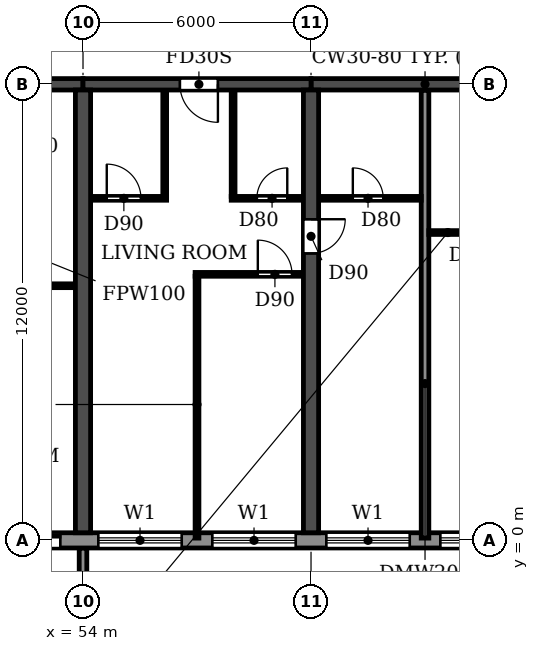
"""IFC4 building model, lengths in metres.
Left out: names, types, materials, properties, quantities, classifications, styles, units other than length and angle.
Written with IfcOpenShell. Run it as: python <this file> out.ifc"""

import sys

from ifc_helpers import new_model, si_unit, direction, frame, frame_2d, origin, place, context, subcontext, project, spatial, polyline, rectangle, outline, extrude, source, transform, mapped, element, fill, save


model = new_model("IFC4")
c1 = context("Model", 3, precision=1e-05, world=origin(), true_north=direction((0.0, 1.0)))
c2 = subcontext(c1, "Body", "Model", "MODEL_VIEW")
j1 = project(units=[si_unit("LENGTHUNIT", "METRE"), si_unit("PLANEANGLEUNIT", "RADIAN")], contexts=[c1])
p1 = place(None, origin())
s1 = spatial("IfcSite", under=j1, at=p1, CompositionType="ELEMENT")
p2 = place(p1, origin())
s2 = spatial("IfcBuilding", under=s1, at=p2, CompositionType="ELEMENT")
p3 = place(p2, frame((0.0, 0.0, 63.0)))
s3 = spatial("IfcBuildingStorey", under=s2, at=p3, CompositionType="ELEMENT", Elevation=63.0)
p4 = place(p3, frame((54.0, 0.2, 0.0), z_axis=(0.0, 0.0, 1.0), x_axis=(0.0, 1.0, 0.0)))
e1 = element("IfcWall", 1, at=p4, inside=s3, PredefinedType="SHEAR", context=c2, shape_type="SweptSolid", body=[
    extrude(rectangle(XDim=11.65, YDim=0.4, at=frame_2d((5.825, 0.0))), origin(), (0.0, 0.0, 1.0), 2.95),
])
p5 = place(p3, frame((60.0, 0.2, 0.0), z_axis=(0.0, 0.0, 1.0), x_axis=(0.0, 1.0, 0.0)))
e2 = element("IfcWall", 2, at=p5, inside=s3, PredefinedType="SHEAR", context=c2, shape_type="SweptSolid", body=[
    extrude(rectangle(XDim=11.65, YDim=0.4, at=frame_2d((5.825, 0.0))), origin(), (0.0, 0.0, 1.0), 2.95),
])
p6 = place(p5, frame((7.35, 0.0, 0.0)))
e3 = element("IfcOpeningElement", 3, at=p6, cuts=e2, PredefinedType="OPENING", context=c2, shape_type="SweptSolid", body=[
    extrude(rectangle(XDim=0.9, YDim=2.1, at=frame_2d((0.45, 1.05))), frame((0.0, 0.21, 0.0), z_axis=(0.0, -1.0, 0.0), x_axis=(1.0, 0.0, 0.0)), (0.0, 0.0, 1.0), 0.42),
])
p7 = place(p3, frame((48.0, 12.0, 0.0), z_axis=(0.0, 0.0, 1.0), x_axis=(1.0, 0.0, 0.0)))
e4 = element("IfcWall", 4, at=p7, inside=s3, PredefinedType="SHEAR", context=c2, shape_type="SweptSolid", body=[
    extrude(rectangle(XDim=6.0, YDim=0.3, at=frame_2d((3.0, 0.0))), origin(), (0.0, 0.0, 1.0), 2.35),
])
p8 = place(p7, frame((2.45, 0.0, 0.0)))
e5 = element("IfcOpeningElement", 5, at=p8, cuts=e4, PredefinedType="OPENING", context=c2, shape_type="SweptSolid", body=[
    extrude(rectangle(XDim=1.0, YDim=2.1, at=frame_2d((0.5, 1.05))), frame((0.0, 0.16, 0.0), z_axis=(0.0, -1.0, 0.0), x_axis=(1.0, 0.0, 0.0)), (0.0, 0.0, 1.0), 0.32),
])
p9 = place(p3, frame((54.0, 12.0, 0.0), z_axis=(0.0, 0.0, 1.0), x_axis=(1.0, 0.0, 0.0)))
e6 = element("IfcWall", 6, at=p9, inside=s3, PredefinedType="SHEAR", context=c2, shape_type="SweptSolid", body=[
    extrude(rectangle(XDim=6.0, YDim=0.3, at=frame_2d((3.0, 0.0))), origin(), (0.0, 0.0, 1.0), 2.35),
])
p10 = place(p9, frame((2.55, 0.0, 0.0)))
e7 = element("IfcOpeningElement", 7, at=p10, cuts=e6, PredefinedType="OPENING", context=c2, shape_type="SweptSolid", body=[
    extrude(rectangle(XDim=1.0, YDim=2.1, at=frame_2d((0.5, 1.05))), frame((0.0, 0.16, 0.0), z_axis=(0.0, -1.0, 0.0), x_axis=(1.0, 0.0, 0.0)), (0.0, 0.0, 1.0), 0.32),
])
p11 = place(p3, frame((60.0, 12.0, 0.0), z_axis=(0.0, 0.0, 1.0), x_axis=(1.0, 0.0, 0.0)))
e8 = element("IfcWall", 8, at=p11, inside=s3, PredefinedType="SHEAR", context=c2, shape_type="SweptSolid", body=[
    extrude(rectangle(XDim=6.0, YDim=0.3, at=frame_2d((3.0, 0.0))), origin(), (0.0, 0.0, 1.0), 2.35),
])
p12 = place(p3, frame((10.683, 0.0, 0.0), z_axis=(0.0, 0.0, 1.0), x_axis=(1.0, 0.0, 0.0)))
e9 = element("IfcWall", 9, at=p12, inside=s3, PredefinedType="STANDARD", context=c2, shape_type="SweptSolid", body=[
    extrude(rectangle(XDim=80.634, YDim=0.4, at=frame_2d((40.317, 0.0))), origin(), (0.0, 0.0, 1.0), 2.95),
])
p13 = place(p12, frame((1.717, 0.0, 0.9)))
e10 = element("IfcOpeningElement", 10, at=p13, cuts=e9, PredefinedType="OPENING", context=c2, shape_type="SweptSolid", body=[
    extrude(rectangle(XDim=2.2, YDim=1.5, at=frame_2d((1.1, 0.75))), frame((0.0, 0.21, 0.0), z_axis=(0.0, -1.0, 0.0), x_axis=(1.0, 0.0, 0.0)), (0.0, 0.0, 1.0), 0.42),
])
p14 = place(p12, frame((4.917, 0.0, 0.0)))
e11 = element("IfcOpeningElement", 11, at=p14, cuts=e9, PredefinedType="OPENING", context=c2, shape_type="SweptSolid", body=[
    extrude(rectangle(XDim=1.8, YDim=2.4, at=frame_2d((0.9, 1.2))), frame((0.0, 0.21, 0.0), z_axis=(0.0, -1.0, 0.0), x_axis=(1.0, 0.0, 0.0)), (0.0, 0.0, 1.0), 0.42),
])
p15 = place(p12, frame((7.717, 0.0, 0.9)))
e12 = element("IfcOpeningElement", 12, at=p15, cuts=e9, PredefinedType="OPENING", context=c2, shape_type="SweptSolid", body=[
    extrude(rectangle(XDim=2.2, YDim=1.5, at=frame_2d((1.1, 0.75))), frame((0.0, 0.21, 0.0), z_axis=(0.0, -1.0, 0.0), x_axis=(1.0, 0.0, 0.0)), (0.0, 0.0, 1.0), 0.42),
])
p16 = place(p12, frame((10.717, 0.0, 0.9)))
e13 = element("IfcOpeningElement", 13, at=p16, cuts=e9, PredefinedType="OPENING", context=c2, shape_type="SweptSolid", body=[
    extrude(rectangle(XDim=2.2, YDim=1.5, at=frame_2d((1.1, 0.75))), frame((0.0, 0.21, 0.0), z_axis=(0.0, -1.0, 0.0), x_axis=(1.0, 0.0, 0.0)), (0.0, 0.0, 1.0), 0.42),
])
p17 = place(p12, frame((13.717, 0.0, 0.9)))
e14 = element("IfcOpeningElement", 14, at=p17, cuts=e9, PredefinedType="OPENING", context=c2, shape_type="SweptSolid", body=[
    extrude(rectangle(XDim=2.2, YDim=1.5, at=frame_2d((1.1, 0.75))), frame((0.0, 0.21, 0.0), z_axis=(0.0, -1.0, 0.0), x_axis=(1.0, 0.0, 0.0)), (0.0, 0.0, 1.0), 0.42),
])
p18 = place(p12, frame((16.917, 0.0, 0.0)))
e15 = element("IfcOpeningElement", 15, at=p18, cuts=e9, PredefinedType="OPENING", context=c2, shape_type="SweptSolid", body=[
    extrude(rectangle(XDim=1.8, YDim=2.4, at=frame_2d((0.9, 1.2))), frame((0.0, 0.21, 0.0), z_axis=(0.0, -1.0, 0.0), x_axis=(1.0, 0.0, 0.0)), (0.0, 0.0, 1.0), 0.42),
])
p19 = place(p12, frame((19.717, 0.0, 0.9)))
e16 = element("IfcOpeningElement", 16, at=p19, cuts=e9, PredefinedType="OPENING", context=c2, shape_type="SweptSolid", body=[
    extrude(rectangle(XDim=2.2, YDim=1.5, at=frame_2d((1.1, 0.75))), frame((0.0, 0.21, 0.0), z_axis=(0.0, -1.0, 0.0), x_axis=(1.0, 0.0, 0.0)), (0.0, 0.0, 1.0), 0.42),
])
p20 = place(p12, frame((22.717, 0.0, 0.9)))
e17 = element("IfcOpeningElement", 17, at=p20, cuts=e9, PredefinedType="OPENING", context=c2, shape_type="SweptSolid", body=[
    extrude(rectangle(XDim=2.2, YDim=1.5, at=frame_2d((1.1, 0.75))), frame((0.0, 0.21, 0.0), z_axis=(0.0, -1.0, 0.0), x_axis=(1.0, 0.0, 0.0)), (0.0, 0.0, 1.0), 0.42),
])
p21 = place(p12, frame((25.917, 0.0, 0.0)))
e18 = element("IfcOpeningElement", 18, at=p21, cuts=e9, PredefinedType="OPENING", context=c2, shape_type="SweptSolid", body=[
    extrude(rectangle(XDim=1.8, YDim=2.4, at=frame_2d((0.9, 1.2))), frame((0.0, 0.21, 0.0), z_axis=(0.0, -1.0, 0.0), x_axis=(1.0, 0.0, 0.0)), (0.0, 0.0, 1.0), 0.42),
])
p22 = place(p12, frame((28.717, 0.0, 0.9)))
e19 = element("IfcOpeningElement", 19, at=p22, cuts=e9, PredefinedType="OPENING", context=c2, shape_type="SweptSolid", body=[
    extrude(rectangle(XDim=2.2, YDim=1.5, at=frame_2d((1.1, 0.75))), frame((0.0, 0.21, 0.0), z_axis=(0.0, -1.0, 0.0), x_axis=(1.0, 0.0, 0.0)), (0.0, 0.0, 1.0), 0.42),
])
p23 = place(p12, frame((31.717, 0.0, 0.9)))
e20 = element("IfcOpeningElement", 20, at=p23, cuts=e9, PredefinedType="OPENING", context=c2, shape_type="SweptSolid", body=[
    extrude(rectangle(XDim=2.2, YDim=1.5, at=frame_2d((1.1, 0.75))), frame((0.0, 0.21, 0.0), z_axis=(0.0, -1.0, 0.0), x_axis=(1.0, 0.0, 0.0)), (0.0, 0.0, 1.0), 0.42),
])
p24 = place(p12, frame((34.717, 0.0, 0.9)))
e21 = element("IfcOpeningElement", 21, at=p24, cuts=e9, PredefinedType="OPENING", context=c2, shape_type="SweptSolid", body=[
    extrude(rectangle(XDim=2.2, YDim=1.5, at=frame_2d((1.1, 0.75))), frame((0.0, 0.21, 0.0), z_axis=(0.0, -1.0, 0.0), x_axis=(1.0, 0.0, 0.0)), (0.0, 0.0, 1.0), 0.42),
])
p25 = place(p12, frame((37.717, 0.0, 0.9)))
e22 = element("IfcOpeningElement", 22, at=p25, cuts=e9, PredefinedType="OPENING", context=c2, shape_type="SweptSolid", body=[
    extrude(rectangle(XDim=2.2, YDim=1.5, at=frame_2d((1.1, 0.75))), frame((0.0, 0.21, 0.0), z_axis=(0.0, -1.0, 0.0), x_axis=(1.0, 0.0, 0.0)), (0.0, 0.0, 1.0), 0.42),
])
p26 = place(p12, frame((40.917, 0.0, 0.0)))
e23 = element("IfcOpeningElement", 23, at=p26, cuts=e9, PredefinedType="OPENING", context=c2, shape_type="SweptSolid", body=[
    extrude(rectangle(XDim=1.8, YDim=2.4, at=frame_2d((0.9, 1.2))), frame((0.0, 0.21, 0.0), z_axis=(0.0, -1.0, 0.0), x_axis=(1.0, 0.0, 0.0)), (0.0, 0.0, 1.0), 0.42),
])
p27 = place(p12, frame((43.717, 0.0, 0.9)))
e24 = element("IfcOpeningElement", 24, at=p27, cuts=e9, PredefinedType="OPENING", context=c2, shape_type="SweptSolid", body=[
    extrude(rectangle(XDim=2.2, YDim=1.5, at=frame_2d((1.1, 0.75))), frame((0.0, 0.21, 0.0), z_axis=(0.0, -1.0, 0.0), x_axis=(1.0, 0.0, 0.0)), (0.0, 0.0, 1.0), 0.42),
])
p28 = place(p12, frame((46.717, 0.0, 0.9)))
e25 = element("IfcOpeningElement", 25, at=p28, cuts=e9, PredefinedType="OPENING", context=c2, shape_type="SweptSolid", body=[
    extrude(rectangle(XDim=2.2, YDim=1.5, at=frame_2d((1.1, 0.75))), frame((0.0, 0.21, 0.0), z_axis=(0.0, -1.0, 0.0), x_axis=(1.0, 0.0, 0.0)), (0.0, 0.0, 1.0), 0.42),
])
p29 = place(p12, frame((49.717, 0.0, 0.9)))
e26 = element("IfcOpeningElement", 26, at=p29, cuts=e9, PredefinedType="OPENING", context=c2, shape_type="SweptSolid", body=[
    extrude(rectangle(XDim=2.2, YDim=1.5, at=frame_2d((1.1, 0.75))), frame((0.0, 0.21, 0.0), z_axis=(0.0, -1.0, 0.0), x_axis=(1.0, 0.0, 0.0)), (0.0, 0.0, 1.0), 0.42),
])
p30 = place(p12, frame((52.717, 0.0, 0.9)))
e27 = element("IfcOpeningElement", 27, at=p30, cuts=e9, PredefinedType="OPENING", context=c2, shape_type="SweptSolid", body=[
    extrude(rectangle(XDim=2.2, YDim=1.5, at=frame_2d((1.1, 0.75))), frame((0.0, 0.21, 0.0), z_axis=(0.0, -1.0, 0.0), x_axis=(1.0, 0.0, 0.0)), (0.0, 0.0, 1.0), 0.42),
])
p31 = place(p12, frame((55.717, 0.0, 0.9)))
e28 = element("IfcOpeningElement", 28, at=p31, cuts=e9, PredefinedType="OPENING", context=c2, shape_type="SweptSolid", body=[
    extrude(rectangle(XDim=2.2, YDim=1.5, at=frame_2d((1.1, 0.75))), frame((0.0, 0.21, 0.0), z_axis=(0.0, -1.0, 0.0), x_axis=(1.0, 0.0, 0.0)), (0.0, 0.0, 1.0), 0.42),
])
p32 = place(p12, frame((58.717, 0.0, 0.9)))
e29 = element("IfcOpeningElement", 29, at=p32, cuts=e9, PredefinedType="OPENING", context=c2, shape_type="SweptSolid", body=[
    extrude(rectangle(XDim=2.2, YDim=1.5, at=frame_2d((1.1, 0.75))), frame((0.0, 0.21, 0.0), z_axis=(0.0, -1.0, 0.0), x_axis=(1.0, 0.0, 0.0)), (0.0, 0.0, 1.0), 0.42),
])
p33 = place(p12, frame((61.717, 0.0, 0.9)))
e30 = element("IfcOpeningElement", 30, at=p33, cuts=e9, PredefinedType="OPENING", context=c2, shape_type="SweptSolid", body=[
    extrude(rectangle(XDim=2.2, YDim=1.5, at=frame_2d((1.1, 0.75))), frame((0.0, 0.21, 0.0), z_axis=(0.0, -1.0, 0.0), x_axis=(1.0, 0.0, 0.0)), (0.0, 0.0, 1.0), 0.42),
])
p34 = place(p12, frame((64.917, 0.0, 0.0)))
e31 = element("IfcOpeningElement", 31, at=p34, cuts=e9, PredefinedType="OPENING", context=c2, shape_type="SweptSolid", body=[
    extrude(rectangle(XDim=1.8, YDim=2.4, at=frame_2d((0.9, 1.2))), frame((0.0, 0.21, 0.0), z_axis=(0.0, -1.0, 0.0), x_axis=(1.0, 0.0, 0.0)), (0.0, 0.0, 1.0), 0.42),
])
p35 = place(p12, frame((67.717, 0.0, 0.9)))
e32 = element("IfcOpeningElement", 32, at=p35, cuts=e9, PredefinedType="OPENING", context=c2, shape_type="SweptSolid", body=[
    extrude(rectangle(XDim=2.2, YDim=1.5, at=frame_2d((1.1, 0.75))), frame((0.0, 0.21, 0.0), z_axis=(0.0, -1.0, 0.0), x_axis=(1.0, 0.0, 0.0)), (0.0, 0.0, 1.0), 0.42),
])
p36 = place(p12, frame((70.717, 0.0, 0.9)))
e33 = element("IfcOpeningElement", 33, at=p36, cuts=e9, PredefinedType="OPENING", context=c2, shape_type="SweptSolid", body=[
    extrude(rectangle(XDim=2.2, YDim=1.5, at=frame_2d((1.1, 0.75))), frame((0.0, 0.21, 0.0), z_axis=(0.0, -1.0, 0.0), x_axis=(1.0, 0.0, 0.0)), (0.0, 0.0, 1.0), 0.42),
])
p37 = place(p12, frame((73.717, 0.0, 0.9)))
e34 = element("IfcOpeningElement", 34, at=p37, cuts=e9, PredefinedType="OPENING", context=c2, shape_type="SweptSolid", body=[
    extrude(rectangle(XDim=2.2, YDim=1.5, at=frame_2d((1.1, 0.75))), frame((0.0, 0.21, 0.0), z_axis=(0.0, -1.0, 0.0), x_axis=(1.0, 0.0, 0.0)), (0.0, 0.0, 1.0), 0.42),
])
p38 = place(p12, frame((76.917, 0.0, 0.0)))
e35 = element("IfcOpeningElement", 35, at=p38, cuts=e9, PredefinedType="OPENING", context=c2, shape_type="SweptSolid", body=[
    extrude(rectangle(XDim=1.8, YDim=2.4, at=frame_2d((0.9, 1.2))), frame((0.0, 0.21, 0.0), z_axis=(0.0, -1.0, 0.0), x_axis=(1.0, 0.0, 0.0)), (0.0, 0.0, 1.0), 0.42),
])
m1 = source(origin(), c2, "Body", "SweptSolid", [
    extrude(outline(polyline([(0.0, 0.0), (0.2, 0.0), (0.2, 1.65), (0.0, 1.65), (0.0, 0.0)])), origin(), (0.0, 0.0, 1.0), 3.1),
])
p39 = place(p3, frame((53.9, -1.85, 0.0)))
e36 = element("IfcWall", 36, at=p39, inside=s3, PredefinedType="STANDARD", context=c2, shape_type="MappedRepresentation", body=[
    mapped(m1, transform((0.0, 0.0, 0.0))),
])
p40 = place(p3, frame((63.0, 0.06, 0.0), z_axis=(0.0, 0.0, 1.0), x_axis=(0.0, 1.0, 0.0)))
e37 = element("IfcWall", 37, at=p40, inside=s3, PredefinedType="PARTITIONING", context=c2, shape_type="SweptSolid", body=[
    extrude(rectangle(XDim=11.78, YDim=0.2, at=frame_2d((5.89, 0.0))), origin(), (0.0, 0.0, 1.0), 2.95),
])
p41 = place(p3, frame((51.8, 6.7, 0.0), z_axis=(0.0, 0.0, 1.0), x_axis=(1.0, 0.0, 0.0)))
e38 = element("IfcWall", 38, at=p41, inside=s3, PredefinedType="PARTITIONING", context=c2, shape_type="SweptSolid", body=[
    extrude(rectangle(XDim=1.99, YDim=0.1, at=frame_2d((0.995, 0.0))), origin(), (0.0, 0.0, 1.0), 2.95),
])
p42 = place(p3, frame((56.95, 7.0, 0.0), z_axis=(0.0, 0.0, 1.0), x_axis=(1.0, 0.0, 0.0)))
e39 = element("IfcWall", 39, at=p42, inside=s3, PredefinedType="PARTITIONING", context=c2, shape_type="SweptSolid", body=[
    extrude(rectangle(XDim=2.84, YDim=0.1, at=frame_2d((1.42, 0.0))), origin(), (0.0, 0.0, 1.0), 2.95),
])
p43 = place(p42, frame((1.65, 0.0, 0.0)))
e40 = element("IfcOpeningElement", 40, at=p43, cuts=e39, PredefinedType="OPENING", context=c2, shape_type="SweptSolid", body=[
    extrude(rectangle(XDim=0.9, YDim=2.1, at=frame_2d((0.45, 1.05))), frame((0.0, 0.06, 0.0), z_axis=(0.0, -1.0, 0.0), x_axis=(1.0, 0.0, 0.0)), (0.0, 0.0, 1.0), 0.12),
])
p44 = place(p3, frame((63.1, 8.1, 0.0), z_axis=(0.0, 0.0, 1.0), x_axis=(1.0, 0.0, 0.0)))
e41 = element("IfcWall", 41, at=p44, inside=s3, PredefinedType="PARTITIONING", context=c2, shape_type="SweptSolid", body=[
    extrude(rectangle(XDim=2.69, YDim=0.1, at=frame_2d((1.345, 0.0))), origin(), (0.0, 0.0, 1.0), 2.95),
])
p45 = place(p44, frame((1.0, 0.0, 0.0)))
e42 = element("IfcOpeningElement", 42, at=p45, cuts=e41, PredefinedType="OPENING", context=c2, shape_type="SweptSolid", body=[
    extrude(rectangle(XDim=0.8, YDim=2.1, at=frame_2d((0.4, 1.05))), frame((0.0, 0.06, 0.0), z_axis=(0.0, -1.0, 0.0), x_axis=(1.0, 0.0, 0.0)), (0.0, 0.0, 1.0), 0.12),
])
p46 = place(p3, frame((54.21, 9.0, 0.0), z_axis=(0.0, 0.0, 1.0), x_axis=(1.0, 0.0, 0.0)))
e43 = element("IfcWall", 43, at=p46, inside=s3, PredefinedType="PARTITIONING", context=c2, shape_type="SweptSolid", body=[
    extrude(rectangle(XDim=1.99, YDim=0.1, at=frame_2d((0.995, 0.0))), origin(), (0.0, 0.0, 1.0), 2.95),
])
p47 = place(p46, frame((0.415, 0.0, 0.0)))
e44 = element("IfcOpeningElement", 44, at=p47, cuts=e43, PredefinedType="OPENING", context=c2, shape_type="SweptSolid", body=[
    extrude(rectangle(XDim=0.9, YDim=2.1, at=frame_2d((0.45, 1.05))), frame((0.0, 0.06, 0.0), z_axis=(0.0, -1.0, 0.0), x_axis=(1.0, 0.0, 0.0)), (0.0, 0.0, 1.0), 0.12),
])
p48 = place(p3, frame((57.9, 9.0, 0.0), z_axis=(0.0, 0.0, 1.0), x_axis=(1.0, 0.0, 0.0)))
e45 = element("IfcWall", 45, at=p48, inside=s3, PredefinedType="PARTITIONING", context=c2, shape_type="SweptSolid", body=[
    extrude(rectangle(XDim=1.89, YDim=0.1, at=frame_2d((0.945, 0.0))), origin(), (0.0, 0.0, 1.0), 2.95),
])
p49 = place(p48, frame((0.675, 0.0, 0.0)))
e46 = element("IfcOpeningElement", 46, at=p49, cuts=e45, PredefinedType="OPENING", context=c2, shape_type="SweptSolid", body=[
    extrude(rectangle(XDim=0.8, YDim=2.1, at=frame_2d((0.4, 1.05))), frame((0.0, 0.06, 0.0), z_axis=(0.0, -1.0, 0.0), x_axis=(1.0, 0.0, 0.0)), (0.0, 0.0, 1.0), 0.12),
])
p50 = place(p3, frame((60.21, 9.0, 0.0), z_axis=(0.0, 0.0, 1.0), x_axis=(1.0, 0.0, 0.0)))
e47 = element("IfcWall", 47, at=p50, inside=s3, PredefinedType="PARTITIONING", context=c2, shape_type="SweptSolid", body=[
    extrude(rectangle(XDim=2.69, YDim=0.1, at=frame_2d((1.345, 0.0))), origin(), (0.0, 0.0, 1.0), 2.95),
])
p51 = place(p50, frame((0.89, 0.0, 0.0)))
e48 = element("IfcOpeningElement", 48, at=p51, cuts=e47, PredefinedType="OPENING", context=c2, shape_type="SweptSolid", body=[
    extrude(rectangle(XDim=0.8, YDim=2.1, at=frame_2d((0.4, 1.05))), frame((0.0, 0.06, 0.0), z_axis=(0.0, -1.0, 0.0), x_axis=(1.0, 0.0, 0.0)), (0.0, 0.0, 1.0), 0.12),
])
p52 = place(p3, frame((56.15, 9.05, 0.0), z_axis=(0.0, 0.0, 1.0), x_axis=(0.0, 1.0, 0.0)))
e49 = element("IfcWall", 49, at=p52, inside=s3, PredefinedType="PARTITIONING", context=c2, shape_type="SweptSolid", body=[
    extrude(rectangle(XDim=2.79, YDim=0.1, at=frame_2d((1.395, 0.0))), origin(), (0.0, 0.0, 1.0), 2.95),
])
p53 = place(p3, frame((57.0, 0.06, 0.0), z_axis=(0.0, 0.0, 1.0), x_axis=(0.0, 1.0, 0.0)))
e50 = element("IfcWall", 50, at=p53, inside=s3, PredefinedType="PARTITIONING", context=c2, shape_type="SweptSolid", body=[
    extrude(rectangle(XDim=6.89, YDim=0.1, at=frame_2d((3.445, 0.0))), origin(), (0.0, 0.0, 1.0), 2.95),
])
p54 = place(p3, frame((57.95, 9.05, 0.0), z_axis=(0.0, 0.0, 1.0), x_axis=(0.0, 1.0, 0.0)))
e51 = element("IfcWall", 51, at=p54, inside=s3, PredefinedType="PARTITIONING", context=c2, shape_type="SweptSolid", body=[
    extrude(rectangle(XDim=2.79, YDim=0.1, at=frame_2d((1.395, 0.0))), origin(), (0.0, 0.0, 1.0), 2.95),
])
p55 = place(p26, origin())
e52 = element("IfcDoor", 52, at=p55, inside=s3, OperationType="DOUBLE_DOOR_SLIDING", PredefinedType="DOOR", context=c2, shape_type="SweptSolid", body=[
    extrude(rectangle(XDim=1.8, YDim=2.4, at=frame_2d((0.9, 1.2))), frame((0.0, 0.025, 0.0), z_axis=(0.0, -1.0, 0.0), x_axis=(1.0, 0.0, 0.0)), (0.0, 0.0, 1.0), 0.05),
])
fill(e23, e52)
p56 = place(p27, origin())
e53 = element("IfcWindow", 53, at=p56, inside=s3, PartitioningType="DOUBLE_PANEL_HORIZONTAL", PredefinedType="WINDOW", context=c2, shape_type="SweptSolid", body=[
    extrude(rectangle(XDim=2.2, YDim=1.5, at=frame_2d((1.1, 0.75))), frame((0.0, 0.03, 0.0), z_axis=(0.0, -1.0, 0.0), x_axis=(1.0, 0.0, 0.0)), (0.0, 0.0, 1.0), 0.06),
])
fill(e24, e53)
p57 = place(p28, origin())
e54 = element("IfcWindow", 54, at=p57, inside=s3, PartitioningType="DOUBLE_PANEL_HORIZONTAL", PredefinedType="WINDOW", context=c2, shape_type="SweptSolid", body=[
    extrude(rectangle(XDim=2.2, YDim=1.5, at=frame_2d((1.1, 0.75))), frame((0.0, 0.03, 0.0), z_axis=(0.0, -1.0, 0.0), x_axis=(1.0, 0.0, 0.0)), (0.0, 0.0, 1.0), 0.06),
])
fill(e25, e54)
p58 = place(p29, origin())
e55 = element("IfcWindow", 55, at=p58, inside=s3, PartitioningType="DOUBLE_PANEL_HORIZONTAL", PredefinedType="WINDOW", context=c2, shape_type="SweptSolid", body=[
    extrude(rectangle(XDim=2.2, YDim=1.5, at=frame_2d((1.1, 0.75))), frame((0.0, 0.03, 0.0), z_axis=(0.0, -1.0, 0.0), x_axis=(1.0, 0.0, 0.0)), (0.0, 0.0, 1.0), 0.06),
])
fill(e26, e55)
p59 = place(p30, origin())
e56 = element("IfcWindow", 56, at=p59, inside=s3, PartitioningType="DOUBLE_PANEL_HORIZONTAL", PredefinedType="WINDOW", context=c2, shape_type="SweptSolid", body=[
    extrude(rectangle(XDim=2.2, YDim=1.5, at=frame_2d((1.1, 0.75))), frame((0.0, 0.03, 0.0), z_axis=(0.0, -1.0, 0.0), x_axis=(1.0, 0.0, 0.0)), (0.0, 0.0, 1.0), 0.06),
])
fill(e27, e56)
p60 = place(p51, origin())
e57 = element("IfcDoor", 57, at=p60, inside=s3, OperationType="SINGLE_SWING_LEFT", PredefinedType="DOOR", context=c2, shape_type="SweptSolid", body=[
    extrude(rectangle(XDim=0.8, YDim=2.1, at=frame_2d((0.4, 1.05))), frame((0.0, 0.025, 0.0), z_axis=(0.0, -1.0, 0.0), x_axis=(1.0, 0.0, 0.0)), (0.0, 0.0, 1.0), 0.05),
])
fill(e48, e57)
p61 = place(p47, origin())
e58 = element("IfcDoor", 58, at=p61, inside=s3, OperationType="SINGLE_SWING_LEFT", PredefinedType="DOOR", context=c2, shape_type="SweptSolid", body=[
    extrude(rectangle(XDim=0.9, YDim=2.1, at=frame_2d((0.45, 1.05))), frame((0.0, 0.025, 0.0), z_axis=(0.0, -1.0, 0.0), x_axis=(1.0, 0.0, 0.0)), (0.0, 0.0, 1.0), 0.05),
])
fill(e44, e58)
p62 = place(p10, frame((1.0, 0.0, 0.0), z_axis=(0.0, 0.0, 1.0), x_axis=(-1.0, 0.0, 0.0)))
e59 = element("IfcDoor", 59, at=p62, inside=s3, OperationType="SINGLE_SWING_LEFT", PredefinedType="DOOR", context=c2, shape_type="SweptSolid", body=[
    extrude(rectangle(XDim=1.0, YDim=2.1, at=frame_2d((0.5, 1.05))), frame((0.0, 0.025, 0.0), z_axis=(0.0, -1.0, 0.0), x_axis=(1.0, 0.0, 0.0)), (0.0, 0.0, 1.0), 0.05),
])
fill(e7, e59)
p63 = place(p49, origin())
e60 = element("IfcDoor", 60, at=p63, inside=s3, OperationType="SINGLE_SWING_RIGHT", PredefinedType="DOOR", context=c2, shape_type="SweptSolid", body=[
    extrude(rectangle(XDim=0.8, YDim=2.1, at=frame_2d((0.4, 1.05))), frame((0.0, 0.025, 0.0), z_axis=(0.0, -1.0, 0.0), x_axis=(1.0, 0.0, 0.0)), (0.0, 0.0, 1.0), 0.05),
])
fill(e46, e60)
p64 = place(p43, origin())
e61 = element("IfcDoor", 61, at=p64, inside=s3, OperationType="SINGLE_SWING_LEFT", PredefinedType="DOOR", context=c2, shape_type="SweptSolid", body=[
    extrude(rectangle(XDim=0.9, YDim=2.1, at=frame_2d((0.45, 1.05))), frame((0.0, 0.025, 0.0), z_axis=(0.0, -1.0, 0.0), x_axis=(1.0, 0.0, 0.0)), (0.0, 0.0, 1.0), 0.05),
])
fill(e40, e61)
p65 = place(p6, frame((0.9, 0.0, 0.0), z_axis=(0.0, 0.0, 1.0), x_axis=(-1.0, 0.0, 0.0)))
e62 = element("IfcDoor", 62, at=p65, inside=s3, OperationType="SINGLE_SWING_LEFT", PredefinedType="DOOR", context=c2, shape_type="SweptSolid", body=[
    extrude(rectangle(XDim=0.9, YDim=2.1, at=frame_2d((0.45, 1.05))), frame((0.0, 0.025, 0.0), z_axis=(0.0, -1.0, 0.0), x_axis=(1.0, 0.0, 0.0)), (0.0, 0.0, 1.0), 0.05),
])
fill(e3, e62)
save(model, sys.argv[1])
